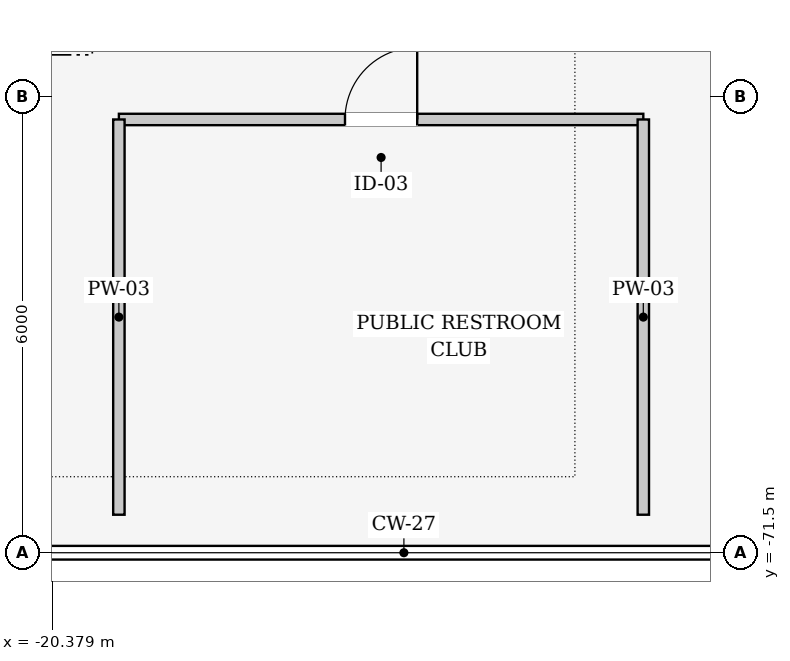
"""IFC4 building model, lengths in metres.
Left out: names, types, materials, properties, quantities, classifications, styles, units other than length and angle.
Written with IfcOpenShell. Run it as: python <this file> out.ifc"""

import sys

from ifc_helpers import new_model, si_unit, direction, frame, frame_2d, origin, place, context, subcontext, project, spatial, rectangle, extrude, element, fill, save


model = new_model("IFC4")
c1 = context("Model", 3, precision=1e-05, world=origin(), true_north=direction((0.0, 1.0)))
c2 = subcontext(c1, "Body", "Model", "MODEL_VIEW")
j1 = project(units=[si_unit("LENGTHUNIT", "METRE"), si_unit("PLANEANGLEUNIT", "RADIAN")], contexts=[c1])
p1 = place(None, origin())
s1 = spatial("IfcSite", under=j1, at=p1, CompositionType="ELEMENT")
p2 = place(p1, origin())
s2 = spatial("IfcBuilding", under=s1, at=p2, CompositionType="ELEMENT")
p3 = place(p2, frame((0.0, 0.0, 11.4)))
s3 = spatial("IfcBuildingStorey", under=s2, at=p3, CompositionType="ELEMENT", Elevation=11.4)
p4 = place(p3, frame((-19.5, -65.8, 0.0), z_axis=(0.0, 0.0, 1.0), x_axis=(1.0, 0.0, 0.0)))
e1 = element("IfcWall", 1, at=p4, inside=s3, PredefinedType="PARTITIONING", context=c2, shape_type="SweptSolid", body=[
    extrude(rectangle(XDim=6.9, YDim=0.15, at=frame_2d((3.45, 0.0))), origin(), (0.0, 0.0, 1.0), 3.645),
])
p5 = place(p4, frame((2.975, 0.0, 0.0)))
e2 = element("IfcOpeningElement", 2, at=p5, cuts=e1, PredefinedType="OPENING", context=c2, shape_type="SweptSolid", body=[
    extrude(rectangle(XDim=0.95, YDim=2.15, at=frame_2d((0.475, 1.075))), frame((0.0, 0.085, 0.0), z_axis=(0.0, -1.0, 0.0), x_axis=(1.0, 0.0, 0.0)), (0.0, 0.0, 1.0), 0.17),
])
for number, where, z_axis, x_axis in (
    (3, (-12.6, -65.8, 0.0), (0.0, 0.0, 1.0), (0.0, -1.0, 0.0)),
    (4, (-19.5, -71.0, 0.0), (0.0, 0.0, 1.0), (0.0, 1.0, 0.0)),
):
    element("IfcWall", number, at=place(p3, frame(where, z_axis=z_axis, x_axis=x_axis)), inside=s3, PredefinedType="PARTITIONING", context=c2, shape_type="SweptSolid", body=[
        extrude(rectangle(XDim=5.2, YDim=0.15, at=frame_2d((2.6, 0.0))), origin(), (0.0, 0.0, 1.0), 3.645),
    ])
p6 = place(p5, origin())
e5 = element("IfcDoor", 5, at=p6, inside=s3, OperationType="SINGLE_SWING_RIGHT", PredefinedType="DOOR", context=c2, shape_type="SweptSolid", body=[
    extrude(rectangle(XDim=0.95, YDim=2.15, at=frame_2d((0.475, 1.075))), frame((0.0, 0.025, 0.0), z_axis=(0.0, -1.0, 0.0), x_axis=(1.0, 0.0, 0.0)), (0.0, 0.0, 1.0), 0.05),
])
fill(e2, e5)
save(model, sys.argv[1])
